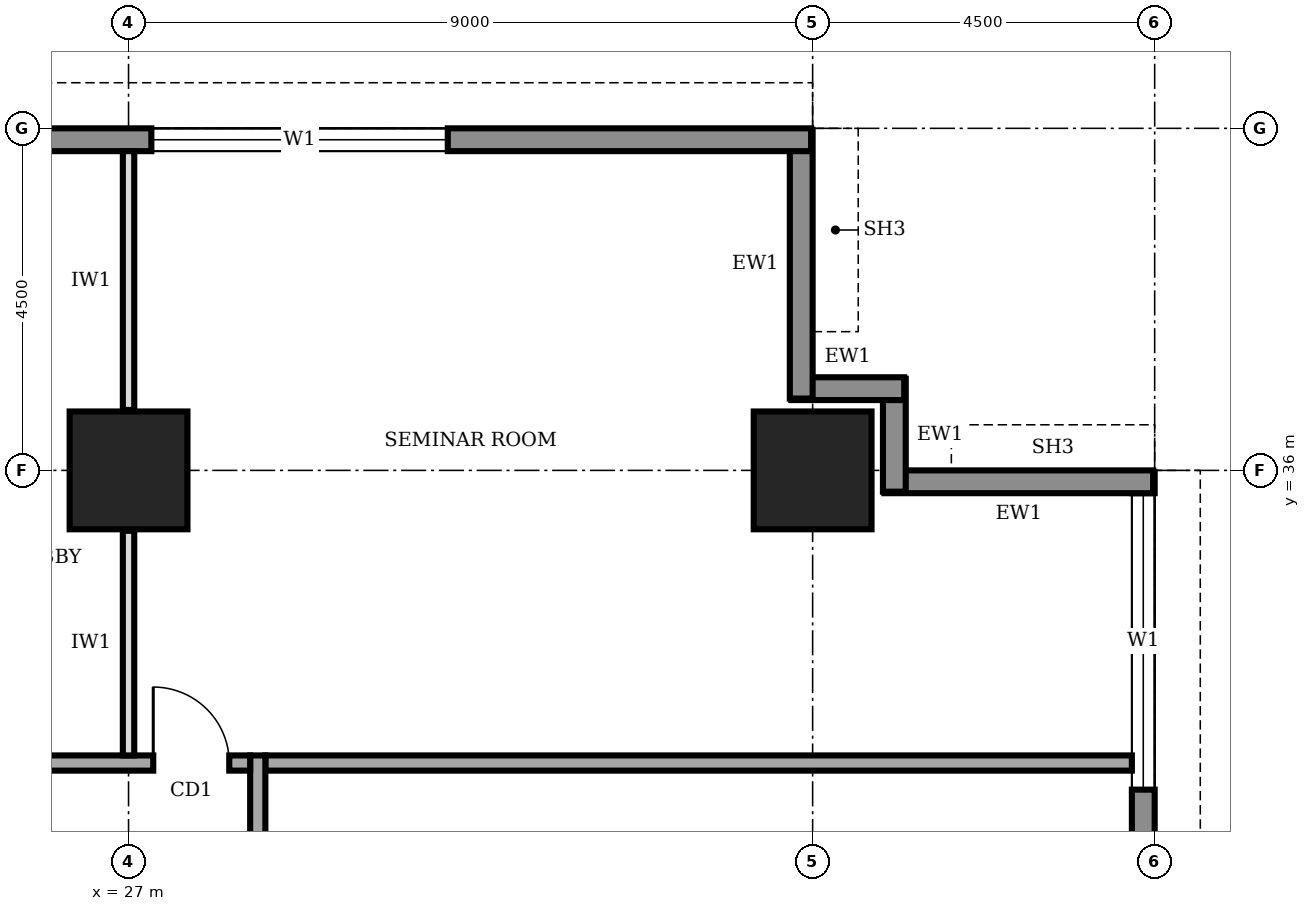
"""IFC4 building model, lengths in metres.
Left out: names, types, materials, properties, quantities, classifications, styles, units other than length and angle.
Written with IfcOpenShell. Run it as: python <this file> out.ifc"""

import sys

from ifc_helpers import new_model, si_unit, direction, frame, frame_2d, origin, origin_2d, place, context, subcontext, project, spatial, rectangle, extrude, element, fill, save


model = new_model("IFC4")
c1 = context("Model", 3, precision=1e-05, world=origin(), true_north=direction((0.0, 1.0)))
c2 = subcontext(c1, "Body", "Model", "MODEL_VIEW")
j1 = project(units=[si_unit("LENGTHUNIT", "METRE"), si_unit("PLANEANGLEUNIT", "RADIAN")], contexts=[c1])
p1 = place(None, origin())
s1 = spatial("IfcSite", under=j1, at=p1, CompositionType="ELEMENT")
p2 = place(p1, origin())
s2 = spatial("IfcBuilding", under=s1, at=p2, CompositionType="ELEMENT")
p3 = place(p2, frame((0.0, 0.0, 225.0)))
s3 = spatial("IfcBuildingStorey", under=s2, at=p3, CompositionType="ELEMENT", Elevation=225.0)
for number, where, z_axis, x_axis in (
    (1, (27.0, 36.0, 0.0), (0.0, 0.0, 1.0), (1.0, 0.0, 0.0)),
    (2, (36.0, 36.0, 0.0), (0.0, 0.0, 1.0), (1.0, 0.0, 0.0)),
):
    element("IfcColumn", number, at=place(p3, frame(where, z_axis=z_axis, x_axis=x_axis)), inside=s3, PredefinedType="COLUMN", context=c2, shape_type="SweptSolid", body=[
        extrude(rectangle(XDim=1.55, YDim=1.55, at=origin_2d()), origin(), (0.0, 0.0, 1.0), 4.0),
    ])
p4 = place(p3, frame((40.35, 4.52, 0.0), z_axis=(0.0, 0.0, 1.0), x_axis=(0.0, 1.0, 0.0)))
e3 = element("IfcWall", 3, at=p4, inside=s3, PredefinedType="STANDARD", context=c2, shape_type="SweptSolid", body=[
    extrude(rectangle(XDim=31.46, YDim=0.3, at=frame_2d((15.73, 0.0))), origin(), (0.0, 0.0, 1.0), 3.75),
])
p5 = place(p4, frame((4.78, 0.0, 0.9)))
e4 = element("IfcOpeningElement", 4, at=p5, cuts=e3, PredefinedType="OPENING", context=c2, shape_type="SweptSolid", body=[
    extrude(rectangle(XDim=3.9, YDim=2.2, at=frame_2d((1.95, 1.1))), frame((0.0, 0.16, 0.0), z_axis=(0.0, -1.0, 0.0), x_axis=(1.0, 0.0, 0.0)), (0.0, 0.0, 1.0), 0.32),
])
p6 = place(p4, frame((9.28, 0.0, 0.9)))
e5 = element("IfcOpeningElement", 5, at=p6, cuts=e3, PredefinedType="OPENING", context=c2, shape_type="SweptSolid", body=[
    extrude(rectangle(XDim=3.9, YDim=2.2, at=frame_2d((1.95, 1.1))), frame((0.0, 0.16, 0.0), z_axis=(0.0, -1.0, 0.0), x_axis=(1.0, 0.0, 0.0)), (0.0, 0.0, 1.0), 0.32),
])
p7 = place(p4, frame((13.78, 0.0, 0.9)))
e6 = element("IfcOpeningElement", 6, at=p7, cuts=e3, PredefinedType="OPENING", context=c2, shape_type="SweptSolid", body=[
    extrude(rectangle(XDim=3.9, YDim=2.2, at=frame_2d((1.95, 1.1))), frame((0.0, 0.16, 0.0), z_axis=(0.0, -1.0, 0.0), x_axis=(1.0, 0.0, 0.0)), (0.0, 0.0, 1.0), 0.32),
])
p8 = place(p4, frame((18.28, 0.0, 0.9)))
e7 = element("IfcOpeningElement", 7, at=p8, cuts=e3, PredefinedType="OPENING", context=c2, shape_type="SweptSolid", body=[
    extrude(rectangle(XDim=3.9, YDim=2.2, at=frame_2d((1.95, 1.1))), frame((0.0, 0.16, 0.0), z_axis=(0.0, -1.0, 0.0), x_axis=(1.0, 0.0, 0.0)), (0.0, 0.0, 1.0), 0.32),
])
p9 = place(p4, frame((22.78, 0.0, 0.9)))
e8 = element("IfcOpeningElement", 8, at=p9, cuts=e3, PredefinedType="OPENING", context=c2, shape_type="SweptSolid", body=[
    extrude(rectangle(XDim=3.9, YDim=2.2, at=frame_2d((1.95, 1.1))), frame((0.0, 0.16, 0.0), z_axis=(0.0, -1.0, 0.0), x_axis=(1.0, 0.0, 0.0)), (0.0, 0.0, 1.0), 0.32),
])
p10 = place(p4, frame((27.28, 0.0, 0.9)))
e9 = element("IfcOpeningElement", 9, at=p10, cuts=e3, PredefinedType="OPENING", context=c2, shape_type="SweptSolid", body=[
    extrude(rectangle(XDim=3.9, YDim=2.2, at=frame_2d((1.95, 1.1))), frame((0.0, 0.16, 0.0), z_axis=(0.0, -1.0, 0.0), x_axis=(1.0, 0.0, 0.0)), (0.0, 0.0, 1.0), 0.32),
])
p11 = place(p3, frame((40.48, 35.85, 0.0), z_axis=(0.0, 0.0, 1.0), x_axis=(-1.0, 0.0, 0.0)))
e10 = element("IfcWall", 10, at=p11, inside=s3, PredefinedType="STANDARD", context=c2, shape_type="SweptSolid", body=[
    extrude(rectangle(XDim=3.535, YDim=0.3, at=frame_2d((1.768, 0.0))), origin(), (0.0, 0.0, 1.0), 2.65),
])
for number, where, z_axis, x_axis in (
    (11, (37.075, 35.72, 0.0), (0.0, 0.0, 1.0), (0.0, 1.0, 0.0)),
    (12, (37.205, 37.075, 0.0), (0.0, 0.0, 1.0), (-1.0, 0.0, 0.0)),
):
    element("IfcWall", number, at=place(p3, frame(where, z_axis=z_axis, x_axis=x_axis)), inside=s3, PredefinedType="STANDARD", context=c2, shape_type="SweptSolid", body=[
        extrude(rectangle(XDim=1.485, YDim=0.3, at=frame_2d((0.743, 0.0))), origin(), (0.0, 0.0, 1.0), 3.75),
    ])
p12 = place(p3, frame((35.85, 36.945, 0.0), z_axis=(0.0, 0.0, 1.0), x_axis=(0.0, 1.0, 0.0)))
e13 = element("IfcWall", 13, at=p12, inside=s3, PredefinedType="STANDARD", context=c2, shape_type="SweptSolid", body=[
    extrude(rectangle(XDim=3.535, YDim=0.3, at=frame_2d((1.768, 0.0))), origin(), (0.0, 0.0, 1.0), 2.65),
])
p13 = place(p3, frame((35.98, 40.35, 0.0), z_axis=(0.0, 0.0, 1.0), x_axis=(-1.0, 0.0, 0.0)))
e14 = element("IfcWall", 14, at=p13, inside=s3, PredefinedType="STANDARD", context=c2, shape_type="SweptSolid", body=[
    extrude(rectangle(XDim=31.46, YDim=0.3, at=frame_2d((15.73, 0.0))), origin(), (0.0, 0.0, 1.0), 3.75),
])
p14 = place(p13, frame((27.28, 0.0, 0.9)))
e15 = element("IfcOpeningElement", 15, at=p14, cuts=e14, PredefinedType="OPENING", context=c2, shape_type="SweptSolid", body=[
    extrude(rectangle(XDim=3.9, YDim=2.2, at=frame_2d((1.95, 1.1))), frame((0.0, 0.16, 0.0), z_axis=(0.0, -1.0, 0.0), x_axis=(1.0, 0.0, 0.0)), (0.0, 0.0, 1.0), 0.32),
])
p15 = place(p13, frame((22.78, 0.0, 0.9)))
e16 = element("IfcOpeningElement", 16, at=p15, cuts=e14, PredefinedType="OPENING", context=c2, shape_type="SweptSolid", body=[
    extrude(rectangle(XDim=3.9, YDim=2.2, at=frame_2d((1.95, 1.1))), frame((0.0, 0.16, 0.0), z_axis=(0.0, -1.0, 0.0), x_axis=(1.0, 0.0, 0.0)), (0.0, 0.0, 1.0), 0.32),
])
p16 = place(p13, frame((4.78, 0.0, 0.9)))
e17 = element("IfcOpeningElement", 17, at=p16, cuts=e14, PredefinedType="OPENING", context=c2, shape_type="SweptSolid", body=[
    extrude(rectangle(XDim=3.9, YDim=2.2, at=frame_2d((1.95, 1.1))), frame((0.0, 0.16, 0.0), z_axis=(0.0, -1.0, 0.0), x_axis=(1.0, 0.0, 0.0)), (0.0, 0.0, 1.0), 0.32),
])
p17 = place(p3, frame((28.7, 8.45, 0.0), z_axis=(0.0, 0.0, 1.0), x_axis=(0.0, 1.0, 0.0)))
e18 = element("IfcWall", 18, at=p17, inside=s3, PredefinedType="SOLIDWALL", context=c2, shape_type="SweptSolid", body=[
    extrude(rectangle(XDim=23.8, YDim=0.2, at=frame_2d((11.9, 0.0))), origin(), (0.0, 0.0, 1.0), 3.75),
])
p18 = place(p17, frame((3.775, 0.0, 0.0)))
e19 = element("IfcOpeningElement", 19, at=p18, cuts=e18, PredefinedType="OPENING", context=c2, shape_type="SweptSolid", body=[
    extrude(rectangle(XDim=1.8, YDim=2.1, at=frame_2d((0.9, 1.05))), frame((0.0, 0.11, 0.0), z_axis=(0.0, -1.0, 0.0), x_axis=(1.0, 0.0, 0.0)), (0.0, 0.0, 1.0), 0.22),
])
p19 = place(p17, frame((11.3, 0.0, 0.0)))
e20 = element("IfcOpeningElement", 20, at=p19, cuts=e18, PredefinedType="OPENING", context=c2, shape_type="SweptSolid", body=[
    extrude(rectangle(XDim=1.0, YDim=2.1, at=frame_2d((0.5, 1.05))), frame((0.0, 0.11, 0.0), z_axis=(0.0, -1.0, 0.0), x_axis=(1.0, 0.0, 0.0)), (0.0, 0.0, 1.0), 0.22),
])
p20 = place(p17, frame((18.025, 0.0, 0.0)))
e21 = element("IfcOpeningElement", 21, at=p20, cuts=e18, PredefinedType="OPENING", context=c2, shape_type="SweptSolid", body=[
    extrude(rectangle(XDim=1.8, YDim=2.1, at=frame_2d((0.9, 1.05))), frame((0.0, 0.11, 0.0), z_axis=(0.0, -1.0, 0.0), x_axis=(1.0, 0.0, 0.0)), (0.0, 0.0, 1.0), 0.22),
])
p21 = place(p3, frame((28.6, 32.15, 0.0), z_axis=(0.0, 0.0, 1.0), x_axis=(-1.0, 0.0, 0.0)))
e22 = element("IfcWall", 22, at=p21, inside=s3, PredefinedType="SOLIDWALL", context=c2, shape_type="SweptSolid", body=[
    extrude(rectangle(XDim=16.9, YDim=0.2, at=frame_2d((8.45, 0.0))), origin(), (0.0, 0.0, 1.0), 3.75),
])
p22 = place(p21, frame((15.425, 0.0, 0.0)))
e23 = element("IfcOpeningElement", 23, at=p22, cuts=e22, PredefinedType="OPENING", context=c2, shape_type="SweptSolid", body=[
    extrude(rectangle(XDim=1.0, YDim=2.1, at=frame_2d((0.5, 1.05))), frame((0.0, 0.11, 0.0), z_axis=(0.0, -1.0, 0.0), x_axis=(1.0, 0.0, 0.0)), (0.0, 0.0, 1.0), 0.22),
])
p23 = place(p21, frame((12.35, 0.0, 0.0)))
e24 = element("IfcOpeningElement", 24, at=p23, cuts=e22, PredefinedType="OPENING", context=c2, shape_type="SweptSolid", body=[
    extrude(rectangle(XDim=1.0, YDim=2.1, at=frame_2d((0.5, 1.05))), frame((0.0, 0.11, 0.0), z_axis=(0.0, -1.0, 0.0), x_axis=(1.0, 0.0, 0.0)), (0.0, 0.0, 1.0), 0.22),
])
p24 = place(p21, frame((5.6, 0.0, 0.0)))
e25 = element("IfcOpeningElement", 25, at=p24, cuts=e22, PredefinedType="OPENING", context=c2, shape_type="SweptSolid", body=[
    extrude(rectangle(XDim=1.0, YDim=2.1, at=frame_2d((0.5, 1.05))), frame((0.0, 0.11, 0.0), z_axis=(0.0, -1.0, 0.0), x_axis=(1.0, 0.0, 0.0)), (0.0, 0.0, 1.0), 0.22),
])
p25 = place(p21, frame((0.275, 0.0, 0.0)))
e26 = element("IfcOpeningElement", 26, at=p25, cuts=e22, PredefinedType="OPENING", context=c2, shape_type="SweptSolid", body=[
    extrude(rectangle(XDim=1.0, YDim=2.1, at=frame_2d((0.5, 1.05))), frame((0.0, 0.11, 0.0), z_axis=(0.0, -1.0, 0.0), x_axis=(1.0, 0.0, 0.0)), (0.0, 0.0, 1.0), 0.22),
])
p26 = place(p3, frame((28.8, 32.15, 0.0), z_axis=(0.0, 0.0, 1.0), x_axis=(1.0, 0.0, 0.0)))
e27 = element("IfcWall", 27, at=p26, inside=s3, PredefinedType="SOLIDWALL", context=c2, shape_type="SweptSolid", body=[
    extrude(rectangle(XDim=11.4, YDim=0.2, at=frame_2d((5.7, 0.0))), origin(), (0.0, 0.0, 1.0), 3.75),
])
p27 = place(p3, frame((27.0, 32.25, 0.0), z_axis=(0.0, 0.0, 1.0), x_axis=(0.0, 1.0, 0.0)))
e28 = element("IfcWall", 28, at=p27, inside=s3, PredefinedType="PARTITIONING", context=c2, shape_type="SweptSolid", body=[
    extrude(rectangle(XDim=2.955, YDim=0.15, at=frame_2d((1.478, 0.0))), origin(), (0.0, 0.0, 1.0), 2.85),
])
p28 = place(p3, frame((27.0, 36.795, 0.0), z_axis=(0.0, 0.0, 1.0), x_axis=(0.0, 1.0, 0.0)))
e29 = element("IfcWall", 29, at=p28, inside=s3, PredefinedType="PARTITIONING", context=c2, shape_type="SweptSolid", body=[
    extrude(rectangle(XDim=3.405, YDim=0.15, at=frame_2d((1.703, 0.0))), origin(), (0.0, 0.0, 1.0), 2.65),
])
p29 = place(p10, origin())
e30 = element("IfcWindow", 30, at=p29, inside=s3, PartitioningType="SINGLE_PANEL", PredefinedType="WINDOW", context=c2, shape_type="SweptSolid", body=[
    extrude(rectangle(XDim=3.9, YDim=2.2, at=frame_2d((1.95, 1.1))), frame((0.0, 0.03, 0.0), z_axis=(0.0, -1.0, 0.0), x_axis=(1.0, 0.0, 0.0)), (0.0, 0.0, 1.0), 0.06),
])
fill(e9, e30)
p30 = place(p16, origin())
e31 = element("IfcWindow", 31, at=p30, inside=s3, PartitioningType="SINGLE_PANEL", PredefinedType="WINDOW", context=c2, shape_type="SweptSolid", body=[
    extrude(rectangle(XDim=3.9, YDim=2.2, at=frame_2d((1.95, 1.1))), frame((0.0, 0.03, 0.0), z_axis=(0.0, -1.0, 0.0), x_axis=(1.0, 0.0, 0.0)), (0.0, 0.0, 1.0), 0.06),
])
fill(e17, e31)
p31 = place(p25, frame((1.0, 0.0, 0.0), z_axis=(0.0, 0.0, 1.0), x_axis=(-1.0, 0.0, 0.0)))
e32 = element("IfcDoor", 32, at=p31, inside=s3, OperationType="SINGLE_SWING_LEFT", PredefinedType="DOOR", context=c2, shape_type="SweptSolid", body=[
    extrude(rectangle(XDim=1.0, YDim=2.1, at=frame_2d((0.5, 1.05))), frame((0.0, 0.025, 0.0), z_axis=(0.0, -1.0, 0.0), x_axis=(1.0, 0.0, 0.0)), (0.0, 0.0, 1.0), 0.05),
])
fill(e26, e32)
save(model, sys.argv[1])
